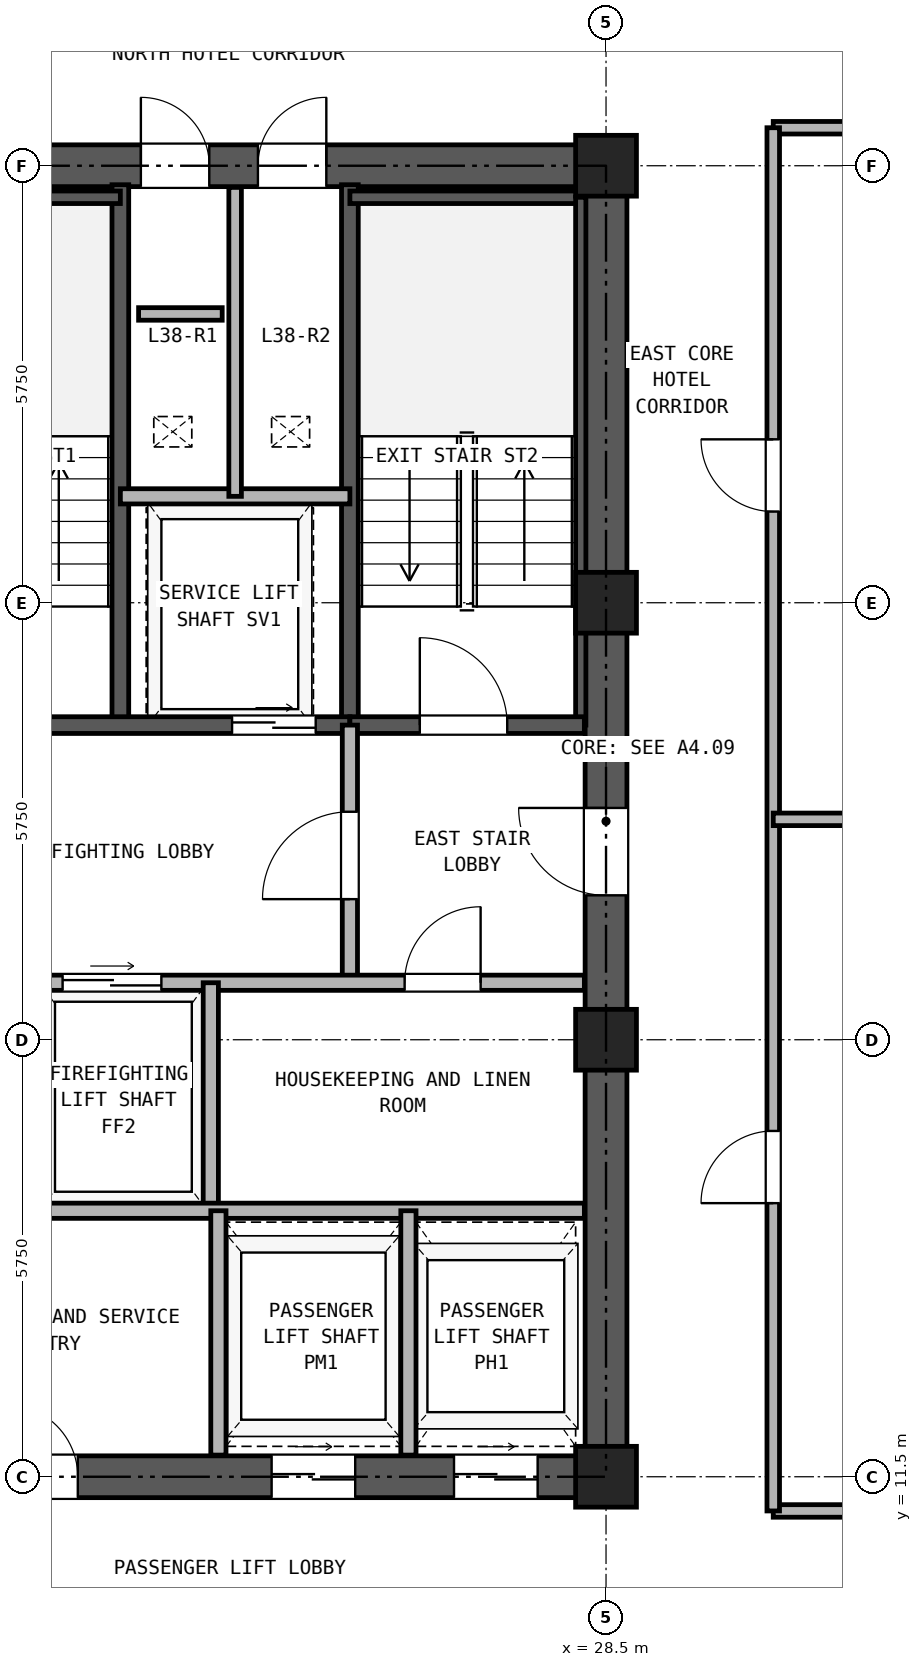
"""IFC4 building model, lengths in metres.
Left out: names, types, materials, properties, quantities, classifications, styles, units other than length and angle.
Written with IfcOpenShell. Run it as: python <this file> out.ifc"""

import sys

from ifc_helpers import new_model, si_unit, direction, frame, frame_2d, origin, origin_2d, place, context, subcontext, project, spatial, rectangle, hollow_rectangle, extrude, source, transform, mapped, element, fill, save


model = new_model("IFC4")
c1 = context("Model", 3, precision=1e-05, world=origin(), true_north=direction((0.0, 1.0)))
c2 = subcontext(c1, "Body", "Model", "MODEL_VIEW")
j1 = project(units=[si_unit("LENGTHUNIT", "METRE"), si_unit("PLANEANGLEUNIT", "RADIAN")], contexts=[c1])
p1 = place(None, origin())
s1 = spatial("IfcSite", under=j1, at=p1, CompositionType="ELEMENT")
p2 = place(p1, origin())
s2 = spatial("IfcBuilding", under=s1, at=p2, CompositionType="ELEMENT")
p3 = place(p2, frame((0.0, 0.0, 137.5)))
s3 = spatial("IfcBuildingStorey", under=s2, at=p3, CompositionType="ELEMENT", Elevation=137.5)
m1 = source(origin(), c2, "Body", "SweptSolid", [
    extrude(hollow_rectangle(XDim=0.8, YDim=0.8, WallThickness=0.045, at=origin_2d()), origin(), (0.0, 0.0, 1.0), 2.95),
])
for number, where, z_axis, x_axis in (
    (1, (28.5, 11.5, 0.0), (0.0, 0.0, 1.0), (1.0, 0.0, 0.0)),
    (2, (28.5, 17.25, 0.0), (0.0, 0.0, 1.0), (1.0, 0.0, 0.0)),
    (3, (28.5, 23.0, 0.0), (0.0, 0.0, 1.0), (1.0, 0.0, 0.0)),
    (4, (28.5, 28.75, 0.0), (0.0, 0.0, 1.0), (1.0, 0.0, 0.0)),
):
    element("IfcColumn", number, at=place(p3, frame(where, z_axis=z_axis, x_axis=x_axis)), inside=s3, PredefinedType="COLUMN", context=c2, shape_type="MappedRepresentation", body=[
        mapped(m1, transform((0.0, 0.0, 0.0), x_axis=(1.0, 0.0, 0.0), y_axis=(0.0, 1.0, 0.0), z_axis=(0.0, 0.0, 1.0), scale=1.0)),
    ])
p4 = place(p3, frame((18.225, 11.5, 0.0), z_axis=(0.0, 0.0, 1.0), x_axis=(1.0, 0.0, 0.0)))
e5 = element("IfcWall", 5, at=p4, inside=s3, PredefinedType="SHEAR", context=c2, shape_type="SweptSolid", body=[
    extrude(rectangle(XDim=10.55, YDim=0.55, at=frame_2d((5.275, 0.0))), origin(), (0.0, 0.0, 1.0), 2.95),
])
p5 = place(p4, frame((2.375, 0.0, 0.0)))
e6 = element("IfcOpeningElement", 6, at=p5, cuts=e5, PredefinedType="OPENING", context=c2, shape_type="SweptSolid", body=[
    extrude(rectangle(XDim=0.95, YDim=2.15, at=frame_2d((0.475, 1.075))), frame((0.0, 0.285, 0.0), z_axis=(0.0, -1.0, 0.0), x_axis=(1.0, 0.0, 0.0)), (0.0, 0.0, 1.0), 0.57),
])
p6 = place(p4, frame((5.875, 0.0, 0.0)))
e7 = element("IfcOpeningElement", 7, at=p6, cuts=e5, PredefinedType="OPENING", context=c2, shape_type="SweptSolid", body=[
    extrude(rectangle(XDim=1.1, YDim=2.25, at=frame_2d((0.55, 1.125))), frame((0.0, 0.285, 0.0), z_axis=(0.0, -1.0, 0.0), x_axis=(1.0, 0.0, 0.0)), (0.0, 0.0, 1.0), 0.57),
])
p7 = place(p4, frame((8.275, 0.0, 0.0)))
e8 = element("IfcOpeningElement", 8, at=p7, cuts=e5, PredefinedType="OPENING", context=c2, shape_type="SweptSolid", body=[
    extrude(rectangle(XDim=1.1, YDim=2.25, at=frame_2d((0.55, 1.125))), frame((0.0, 0.285, 0.0), z_axis=(0.0, -1.0, 0.0), x_axis=(1.0, 0.0, 0.0)), (0.0, 0.0, 1.0), 0.57),
])
p8 = place(p3, frame((18.225, 28.75, 0.0), z_axis=(0.0, 0.0, 1.0), x_axis=(1.0, 0.0, 0.0)))
e9 = element("IfcWall", 9, at=p8, inside=s3, PredefinedType="SHEAR", context=c2, shape_type="SweptSolid", body=[
    extrude(rectangle(XDim=10.55, YDim=0.55, at=frame_2d((5.275, 0.0))), origin(), (0.0, 0.0, 1.0), 2.95),
])
p9 = place(p8, frame((4.155, 0.0, 0.0)))
e10 = element("IfcOpeningElement", 10, at=p9, cuts=e9, PredefinedType="OPENING", context=c2, shape_type="SweptSolid", body=[
    extrude(rectangle(XDim=0.9, YDim=2.05, at=frame_2d((0.45, 1.025))), frame((0.0, 0.285, 0.0), z_axis=(0.0, -1.0, 0.0), x_axis=(1.0, 0.0, 0.0)), (0.0, 0.0, 1.0), 0.57),
])
p10 = place(p8, frame((5.695, 0.0, 0.0)))
e11 = element("IfcOpeningElement", 11, at=p10, cuts=e9, PredefinedType="OPENING", context=c2, shape_type="SweptSolid", body=[
    extrude(rectangle(XDim=0.9, YDim=2.05, at=frame_2d((0.45, 1.025))), frame((0.0, 0.285, 0.0), z_axis=(0.0, -1.0, 0.0), x_axis=(1.0, 0.0, 0.0)), (0.0, 0.0, 1.0), 0.57),
])
p11 = place(p3, frame((28.5, 11.775, 0.0), z_axis=(0.0, 0.0, 1.0), x_axis=(0.0, 1.0, 0.0)))
e12 = element("IfcWall", 12, at=p11, inside=s3, PredefinedType="SHEAR", context=c2, shape_type="SweptSolid", body=[
    extrude(rectangle(XDim=16.7, YDim=0.55, at=frame_2d((8.35, 0.0))), origin(), (0.0, 0.0, 1.0), 2.95),
])
p12 = place(p11, frame((7.375, 0.0, 0.0)))
e13 = element("IfcOpeningElement", 13, at=p12, cuts=e12, PredefinedType="OPENING", context=c2, shape_type="SweptSolid", body=[
    extrude(rectangle(XDim=1.15, YDim=2.2, at=frame_2d((0.575, 1.1))), frame((0.0, 0.285, 0.0), z_axis=(0.0, -1.0, 0.0), x_axis=(1.0, 0.0, 0.0)), (0.0, 0.0, 1.0), 0.57),
])
for number, where, z_axis, x_axis in (
    (14, (22.11, 21.39, 0.0), (0.0, 0.0, 1.0), (0.0, 1.0, 0.0)),
    (15, (25.13, 21.39, 0.0), (0.0, 0.0, 1.0), (0.0, 1.0, 0.0)),
):
    element("IfcWall", number, at=place(p3, frame(where, z_axis=z_axis, x_axis=x_axis)), inside=s3, PredefinedType="SOLIDWALL", context=c2, shape_type="SweptSolid", body=[
        extrude(rectangle(XDim=7.11, YDim=0.22, at=frame_2d((3.555, 0.0))), origin(), (0.0, 0.0, 1.0), 2.95),
    ])
p13 = place(p3, frame((18.785, 28.335, 0.0), z_axis=(0.0, 0.0, 1.0), x_axis=(1.0, 0.0, 0.0)))
e16 = element("IfcWall", 16, at=p13, inside=s3, PredefinedType="PARTITIONING", context=c2, shape_type="SweptSolid", body=[
    extrude(rectangle(XDim=3.325, YDim=0.165, at=frame_2d((1.663, 0.0))), origin(), (0.0, 0.0, 1.0), 2.95),
])
p14 = place(p3, frame((25.13, 28.335, 0.0), z_axis=(0.0, 0.0, 1.0), x_axis=(1.0, 0.0, 0.0)))
e17 = element("IfcWall", 17, at=p14, inside=s3, PredefinedType="PARTITIONING", context=c2, shape_type="SweptSolid", body=[
    extrude(rectangle(XDim=3.085, YDim=0.165, at=frame_2d((1.542, 0.0))), origin(), (0.0, 0.0, 1.0), 2.95),
])
p15 = place(p3, frame((28.167, 21.39, 0.0), z_axis=(0.0, 0.0, 1.0), x_axis=(0.0, 1.0, 0.0)))
e18 = element("IfcWall", 18, at=p15, inside=s3, PredefinedType="PARTITIONING", context=c2, shape_type="SweptSolid", body=[
    extrude(rectangle(XDim=6.945, YDim=0.135, at=frame_2d((3.473, 0.0))), origin(), (0.0, 0.0, 1.0), 2.95),
])
p16 = place(p3, frame((18.785, 21.39, 0.0), z_axis=(0.0, 0.0, 1.0), x_axis=(1.0, 0.0, 0.0)))
e19 = element("IfcWall", 19, at=p16, inside=s3, PredefinedType="SOLIDWALL", context=c2, shape_type="SweptSolid", body=[
    extrude(rectangle(XDim=6.345, YDim=0.22, at=frame_2d((3.172, 0.0))), origin(), (0.0, 0.0, 1.0), 2.95),
])
p17 = place(p16, frame((1.065, 0.0, 0.0)))
e20 = element("IfcOpeningElement", 20, at=p17, cuts=e19, PredefinedType="OPENING", context=c2, shape_type="SweptSolid", body=[
    extrude(rectangle(XDim=1.15, YDim=2.2, at=frame_2d((0.575, 1.1))), frame((0.0, 0.12, 0.0), z_axis=(0.0, -1.0, 0.0), x_axis=(1.0, 0.0, 0.0)), (0.0, 0.0, 1.0), 0.24),
])
p18 = place(p16, frame((4.795, 0.0, 0.0)))
e21 = element("IfcOpeningElement", 21, at=p18, cuts=e19, PredefinedType="OPENING", context=c2, shape_type="SweptSolid", body=[
    extrude(rectangle(XDim=1.1, YDim=2.25, at=frame_2d((0.55, 1.125))), frame((0.0, 0.12, 0.0), z_axis=(0.0, -1.0, 0.0), x_axis=(1.0, 0.0, 0.0)), (0.0, 0.0, 1.0), 0.24),
])
p19 = place(p3, frame((25.13, 21.39, 0.0), z_axis=(0.0, 0.0, 1.0), x_axis=(1.0, 0.0, 0.0)))
e22 = element("IfcWall", 22, at=p19, inside=s3, PredefinedType="SOLIDWALL", context=c2, shape_type="SweptSolid", body=[
    extrude(rectangle(XDim=3.085, YDim=0.22, at=frame_2d((1.542, 0.0))), origin(), (0.0, 0.0, 1.0), 2.95),
])
p20 = place(p19, frame((0.92, 0.0, 0.0)))
e23 = element("IfcOpeningElement", 23, at=p20, cuts=e22, PredefinedType="OPENING", context=c2, shape_type="SweptSolid", body=[
    extrude(rectangle(XDim=1.15, YDim=2.2, at=frame_2d((0.575, 1.1))), frame((0.0, 0.12, 0.0), z_axis=(0.0, -1.0, 0.0), x_axis=(1.0, 0.0, 0.0)), (0.0, 0.0, 1.0), 0.24),
])
p21 = place(p3, frame((22.11, 24.4, 0.0), z_axis=(0.0, 0.0, 1.0), x_axis=(1.0, 0.0, 0.0)))
e24 = element("IfcWall", 24, at=p21, inside=s3, PredefinedType="PARTITIONING", context=c2, shape_type="SweptSolid", body=[
    extrude(rectangle(XDim=3.02, YDim=0.2, at=frame_2d((1.51, 0.0))), origin(), (0.0, 0.0, 1.0), 2.95),
])
p22 = place(p3, frame((23.62, 24.4, 0.0), z_axis=(0.0, 0.0, 1.0), x_axis=(0.0, 1.0, 0.0)))
e25 = element("IfcWall", 25, at=p22, inside=s3, PredefinedType="PARTITIONING", context=c2, shape_type="SweptSolid", body=[
    extrude(rectangle(XDim=4.065, YDim=0.165, at=frame_2d((2.033, 0.0))), origin(), (0.0, 0.0, 1.0), 2.95),
])
p23 = place(p3, frame((25.13, 18.0, 0.0), z_axis=(0.0, 0.0, 1.0), x_axis=(0.0, 1.0, 0.0)))
e26 = element("IfcWall", 26, at=p23, inside=s3, PredefinedType="PARTITIONING", context=c2, shape_type="SweptSolid", body=[
    extrude(rectangle(XDim=3.39, YDim=0.2, at=frame_2d((1.695, 0.0))), origin(), (0.0, 0.0, 1.0), 2.95),
])
p24 = place(p23, frame((1.1, 0.0, 0.0)))
e27 = element("IfcOpeningElement", 27, at=p24, cuts=e26, PredefinedType="OPENING", context=c2, shape_type="SweptSolid", body=[
    extrude(rectangle(XDim=1.15, YDim=2.2, at=frame_2d((0.575, 1.1))), frame((0.0, 0.11, 0.0), z_axis=(0.0, -1.0, 0.0), x_axis=(1.0, 0.0, 0.0)), (0.0, 0.0, 1.0), 0.22),
])
p25 = place(p3, frame((18.785, 18.0, 0.0), z_axis=(0.0, 0.0, 1.0), x_axis=(1.0, 0.0, 0.0)))
e28 = element("IfcWall", 28, at=p25, inside=s3, PredefinedType="PARTITIONING", context=c2, shape_type="SweptSolid", body=[
    extrude(rectangle(XDim=9.43, YDim=0.2, at=frame_2d((4.715, 0.0))), origin(), (0.0, 0.0, 1.0), 2.95),
])
p26 = place(p25, frame((0.465, 0.0, 0.0)))
e29 = element("IfcOpeningElement", 29, at=p26, cuts=e28, PredefinedType="OPENING", context=c2, shape_type="SweptSolid", body=[
    extrude(rectangle(XDim=1.3, YDim=2.3, at=frame_2d((0.65, 1.15))), frame((0.0, 0.11, 0.0), z_axis=(0.0, -1.0, 0.0), x_axis=(1.0, 0.0, 0.0)), (0.0, 0.0, 1.0), 0.22),
])
p27 = place(p25, frame((2.565, 0.0, 0.0)))
e30 = element("IfcOpeningElement", 30, at=p27, cuts=e28, PredefinedType="OPENING", context=c2, shape_type="SweptSolid", body=[
    extrude(rectangle(XDim=1.3, YDim=2.3, at=frame_2d((0.65, 1.15))), frame((0.0, 0.11, 0.0), z_axis=(0.0, -1.0, 0.0), x_axis=(1.0, 0.0, 0.0)), (0.0, 0.0, 1.0), 0.22),
])
p28 = place(p25, frame((7.065, 0.0, 0.0)))
e31 = element("IfcOpeningElement", 31, at=p28, cuts=e28, PredefinedType="OPENING", context=c2, shape_type="SweptSolid", body=[
    extrude(rectangle(XDim=1.0, YDim=2.15, at=frame_2d((0.5, 1.075))), frame((0.0, 0.11, 0.0), z_axis=(0.0, -1.0, 0.0), x_axis=(1.0, 0.0, 0.0)), (0.0, 0.0, 1.0), 0.22),
])
p29 = place(p3, frame((23.3, 15.0, 0.0), z_axis=(0.0, 0.0, 1.0), x_axis=(0.0, 1.0, 0.0)))
e32 = element("IfcWall", 32, at=p29, inside=s3, PredefinedType="PARTITIONING", context=c2, shape_type="SweptSolid", body=[
    extrude(rectangle(XDim=3.0, YDim=0.2, at=frame_2d((1.5, 0.0))), origin(), (0.0, 0.0, 1.0), 2.95),
])
p30 = place(p3, frame((18.785, 15.0, 0.0), z_axis=(0.0, 0.0, 1.0), x_axis=(1.0, 0.0, 0.0)))
e33 = element("IfcWall", 33, at=p30, inside=s3, PredefinedType="PARTITIONING", context=c2, shape_type="SweptSolid", body=[
    extrude(rectangle(XDim=9.43, YDim=0.2, at=frame_2d((4.715, 0.0))), origin(), (0.0, 0.0, 1.0), 2.95),
])
for number, where, z_axis, x_axis in (
    (34, (23.4, 11.785, 0.0), (0.0, 0.0, 1.0), (0.0, 1.0, 0.0)),
    (35, (25.9, 11.785, 0.0), (0.0, 0.0, 1.0), (0.0, 1.0, 0.0)),
):
    element("IfcWall", number, at=place(p3, frame(where, z_axis=z_axis, x_axis=x_axis)), inside=s3, PredefinedType="PARTITIONING", context=c2, shape_type="SweptSolid", body=[
        extrude(rectangle(XDim=3.215, YDim=0.2, at=frame_2d((1.607, 0.0))), origin(), (0.0, 0.0, 1.0), 2.95),
    ])
for number, where, z_axis, x_axis in (
    (36, (30.7, 11.05, 0.0), (0.0, 0.0, 1.0), (1.0, 0.0, 0.0)),
    (37, (30.7, 29.25, 0.0), (0.0, 0.0, 1.0), (1.0, 0.0, 0.0)),
):
    element("IfcWall", number, at=place(p3, frame(where, z_axis=z_axis, x_axis=x_axis)), inside=s3, PredefinedType="PARTITIONING", context=c2, shape_type="SweptSolid", body=[
        extrude(rectangle(XDim=7.5, YDim=0.165, at=frame_2d((3.75, 0.0))), origin(), (0.0, 0.0, 1.0), 2.95),
    ])
p31 = place(p3, frame((30.7, 11.05, 0.0), z_axis=(0.0, 0.0, 1.0), x_axis=(0.0, 1.0, 0.0)))
e38 = element("IfcWall", 38, at=p31, inside=s3, PredefinedType="PARTITIONING", context=c2, shape_type="SweptSolid", body=[
    extrude(rectangle(XDim=18.2, YDim=0.165, at=frame_2d((9.1, 0.0))), origin(), (0.0, 0.0, 1.0), 2.95),
])
p32 = place(p31, frame((4.05, 0.0, 0.0)))
e39 = element("IfcOpeningElement", 39, at=p32, cuts=e38, PredefinedType="OPENING", context=c2, shape_type="SweptSolid", body=[
    extrude(rectangle(XDim=0.95, YDim=2.15, at=frame_2d((0.475, 1.075))), frame((0.0, 0.093, 0.0), z_axis=(0.0, -1.0, 0.0), x_axis=(1.0, 0.0, 0.0)), (0.0, 0.0, 1.0), 0.185),
])
p33 = place(p31, frame((13.15, 0.0, 0.0)))
e40 = element("IfcOpeningElement", 40, at=p33, cuts=e38, PredefinedType="OPENING", context=c2, shape_type="SweptSolid", body=[
    extrude(rectangle(XDim=0.95, YDim=2.15, at=frame_2d((0.475, 1.075))), frame((0.0, 0.093, 0.0), z_axis=(0.0, -1.0, 0.0), x_axis=(1.0, 0.0, 0.0)), (0.0, 0.0, 1.0), 0.185),
])
p34 = place(p3, frame((30.7, 20.15, 0.0), z_axis=(0.0, 0.0, 1.0), x_axis=(1.0, 0.0, 0.0)))
e41 = element("IfcWall", 41, at=p34, inside=s3, PredefinedType="PARTITIONING", context=c2, shape_type="SweptSolid", body=[
    extrude(rectangle(XDim=16.14, YDim=0.165, at=frame_2d((8.07, 0.0))), origin(), (0.0, 0.0, 1.0), 2.583),
])
p35 = place(p3, frame((22.35, 26.8, 0.0), z_axis=(0.0, 0.0, 1.0), x_axis=(1.0, 0.0, 0.0)))
e42 = element("IfcWall", 42, at=p35, inside=s3, PredefinedType="PARTITIONING", context=c2, shape_type="SweptSolid", body=[
    extrude(rectangle(XDim=1.1, YDim=0.165, at=frame_2d((0.55, 0.0))), origin(), (0.0, 0.0, 1.0), 2.95),
])
p36 = place(p20, frame((1.15, 0.0, 0.0), z_axis=(0.0, 0.0, 1.0), x_axis=(-1.0, 0.0, 0.0)))
e43 = element("IfcDoor", 43, at=p36, inside=s3, OperationType="SINGLE_SWING_LEFT", PredefinedType="DOOR", context=c2, shape_type="SweptSolid", body=[
    extrude(rectangle(XDim=1.15, YDim=2.2, at=frame_2d((0.575, 1.1))), frame((0.0, 0.025, 0.0), z_axis=(0.0, -1.0, 0.0), x_axis=(1.0, 0.0, 0.0)), (0.0, 0.0, 1.0), 0.05),
])
fill(e23, e43)
p37 = place(p18, frame((1.1, 0.0, 0.0), z_axis=(0.0, 0.0, 1.0), x_axis=(-1.0, 0.0, 0.0)))
e44 = element("IfcDoor", 44, at=p37, inside=s3, OperationType="DOUBLE_DOOR_SLIDING", PredefinedType="DOOR", context=c2, shape_type="SweptSolid", body=[
    extrude(rectangle(XDim=1.1, YDim=2.25, at=frame_2d((0.55, 1.125))), frame((0.0, 0.025, 0.0), z_axis=(0.0, -1.0, 0.0), x_axis=(1.0, 0.0, 0.0)), (0.0, 0.0, 1.0), 0.05),
])
fill(e21, e44)
p38 = place(p24, origin())
e45 = element("IfcDoor", 45, at=p38, inside=s3, OperationType="SINGLE_SWING_LEFT", PredefinedType="DOOR", context=c2, shape_type="SweptSolid", body=[
    extrude(rectangle(XDim=1.15, YDim=2.2, at=frame_2d((0.575, 1.1))), frame((0.0, 0.025, 0.0), z_axis=(0.0, -1.0, 0.0), x_axis=(1.0, 0.0, 0.0)), (0.0, 0.0, 1.0), 0.05),
])
fill(e27, e45)
p39 = place(p27, origin())
e46 = element("IfcDoor", 46, at=p39, inside=s3, OperationType="DOUBLE_DOOR_SLIDING", PredefinedType="DOOR", context=c2, shape_type="SweptSolid", body=[
    extrude(rectangle(XDim=1.3, YDim=2.3, at=frame_2d((0.65, 1.15))), frame((0.0, 0.025, 0.0), z_axis=(0.0, -1.0, 0.0), x_axis=(1.0, 0.0, 0.0)), (0.0, 0.0, 1.0), 0.05),
])
fill(e30, e46)
p40 = place(p28, frame((1.0, 0.0, 0.0), z_axis=(0.0, 0.0, 1.0), x_axis=(-1.0, 0.0, 0.0)))
e47 = element("IfcDoor", 47, at=p40, inside=s3, OperationType="SINGLE_SWING_RIGHT", PredefinedType="DOOR", context=c2, shape_type="SweptSolid", body=[
    extrude(rectangle(XDim=1.0, YDim=2.15, at=frame_2d((0.5, 1.075))), frame((0.0, 0.025, 0.0), z_axis=(0.0, -1.0, 0.0), x_axis=(1.0, 0.0, 0.0)), (0.0, 0.0, 1.0), 0.05),
])
fill(e31, e47)
p41 = place(p12, origin())
e48 = element("IfcDoor", 48, at=p41, inside=s3, OperationType="SINGLE_SWING_RIGHT", PredefinedType="DOOR", context=c2, shape_type="SweptSolid", body=[
    extrude(rectangle(XDim=1.15, YDim=2.2, at=frame_2d((0.575, 1.1))), frame((0.0, 0.025, 0.0), z_axis=(0.0, -1.0, 0.0), x_axis=(1.0, 0.0, 0.0)), (0.0, 0.0, 1.0), 0.05),
])
fill(e13, e48)
p42 = place(p9, origin())
e49 = element("IfcDoor", 49, at=p42, inside=s3, OperationType="SINGLE_SWING_LEFT", PredefinedType="DOOR", context=c2, shape_type="SweptSolid", body=[
    extrude(rectangle(XDim=0.9, YDim=2.05, at=frame_2d((0.45, 1.025))), frame((0.0, 0.025, 0.0), z_axis=(0.0, -1.0, 0.0), x_axis=(1.0, 0.0, 0.0)), (0.0, 0.0, 1.0), 0.05),
])
fill(e10, e49)
p43 = place(p10, origin())
e50 = element("IfcDoor", 50, at=p43, inside=s3, OperationType="SINGLE_SWING_RIGHT", PredefinedType="DOOR", context=c2, shape_type="SweptSolid", body=[
    extrude(rectangle(XDim=0.9, YDim=2.05, at=frame_2d((0.45, 1.025))), frame((0.0, 0.025, 0.0), z_axis=(0.0, -1.0, 0.0), x_axis=(1.0, 0.0, 0.0)), (0.0, 0.0, 1.0), 0.05),
])
fill(e11, e50)
p44 = place(p5, frame((0.95, 0.0, 0.0), z_axis=(0.0, 0.0, 1.0), x_axis=(-1.0, 0.0, 0.0)))
e51 = element("IfcDoor", 51, at=p44, inside=s3, OperationType="SINGLE_SWING_LEFT", PredefinedType="DOOR", context=c2, shape_type="SweptSolid", body=[
    extrude(rectangle(XDim=0.95, YDim=2.15, at=frame_2d((0.475, 1.075))), frame((0.0, 0.025, 0.0), z_axis=(0.0, -1.0, 0.0), x_axis=(1.0, 0.0, 0.0)), (0.0, 0.0, 1.0), 0.05),
])
fill(e6, e51)
p45 = place(p6, frame((1.1, 0.0, 0.0), z_axis=(0.0, 0.0, 1.0), x_axis=(-1.0, 0.0, 0.0)))
e52 = element("IfcDoor", 52, at=p45, inside=s3, OperationType="DOUBLE_DOOR_SLIDING", PredefinedType="DOOR", context=c2, shape_type="SweptSolid", body=[
    extrude(rectangle(XDim=1.1, YDim=2.25, at=frame_2d((0.55, 1.125))), frame((0.0, 0.025, 0.0), z_axis=(0.0, -1.0, 0.0), x_axis=(1.0, 0.0, 0.0)), (0.0, 0.0, 1.0), 0.05),
])
fill(e7, e52)
p46 = place(p7, frame((1.1, 0.0, 0.0), z_axis=(0.0, 0.0, 1.0), x_axis=(-1.0, 0.0, 0.0)))
e53 = element("IfcDoor", 53, at=p46, inside=s3, OperationType="DOUBLE_DOOR_SLIDING", PredefinedType="DOOR", context=c2, shape_type="SweptSolid", body=[
    extrude(rectangle(XDim=1.1, YDim=2.25, at=frame_2d((0.55, 1.125))), frame((0.0, 0.025, 0.0), z_axis=(0.0, -1.0, 0.0), x_axis=(1.0, 0.0, 0.0)), (0.0, 0.0, 1.0), 0.05),
])
fill(e8, e53)
p47 = place(p32, origin())
e54 = element("IfcDoor", 54, at=p47, inside=s3, OperationType="SINGLE_SWING_LEFT", PredefinedType="DOOR", context=c2, shape_type="SweptSolid", body=[
    extrude(rectangle(XDim=0.95, YDim=2.15, at=frame_2d((0.475, 1.075))), frame((0.0, 0.025, 0.0), z_axis=(0.0, -1.0, 0.0), x_axis=(1.0, 0.0, 0.0)), (0.0, 0.0, 1.0), 0.05),
])
fill(e39, e54)
p48 = place(p33, origin())
e55 = element("IfcDoor", 55, at=p48, inside=s3, OperationType="SINGLE_SWING_RIGHT", PredefinedType="DOOR", context=c2, shape_type="SweptSolid", body=[
    extrude(rectangle(XDim=0.95, YDim=2.15, at=frame_2d((0.475, 1.075))), frame((0.0, 0.025, 0.0), z_axis=(0.0, -1.0, 0.0), x_axis=(1.0, 0.0, 0.0)), (0.0, 0.0, 1.0), 0.05),
])
fill(e40, e55)
save(model, sys.argv[1])
